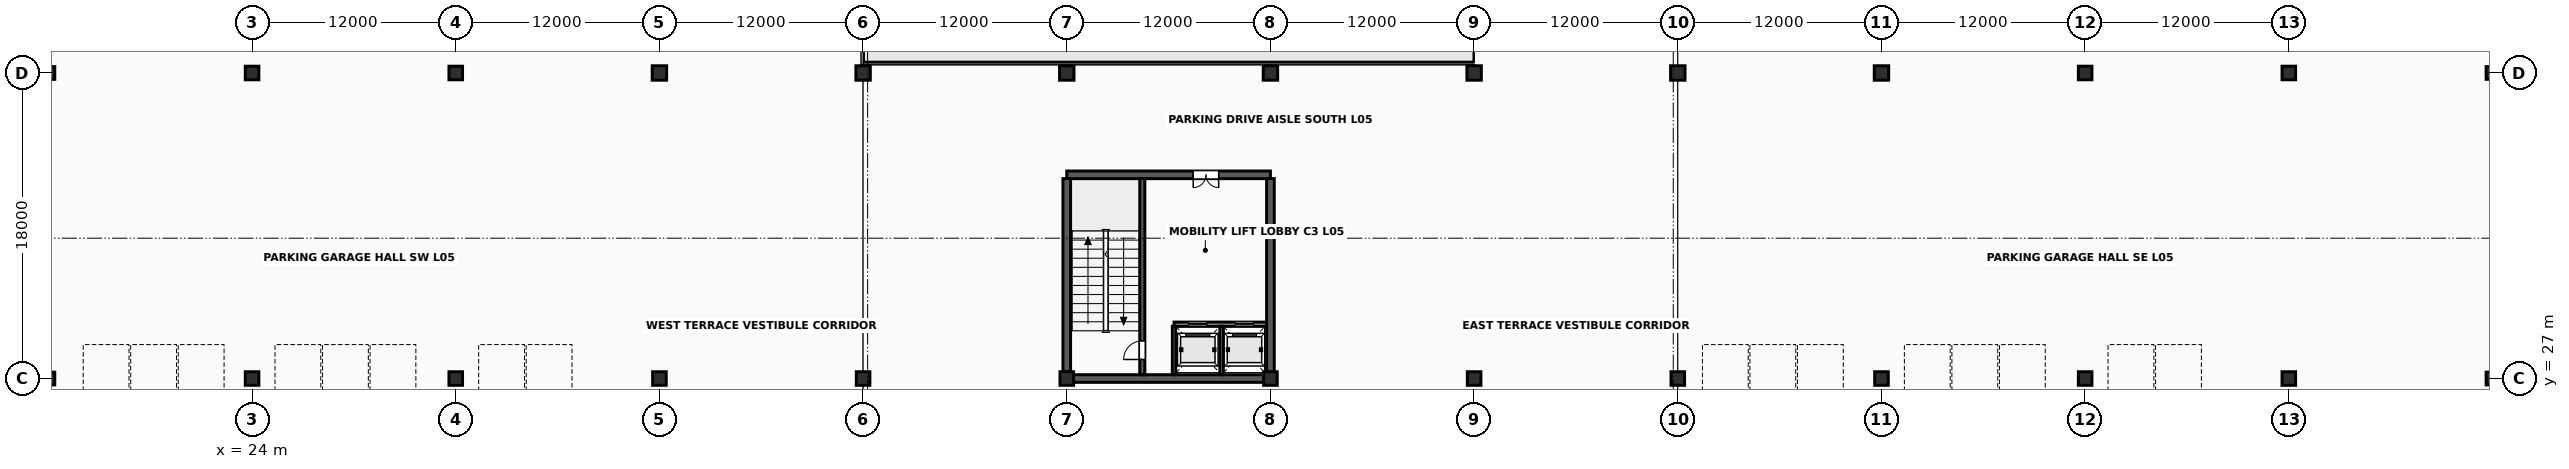
"""IFC4 building model, lengths in metres.
Left out: names, types, materials, properties, quantities, classifications, styles, units other than length and angle.
Written with IfcOpenShell. Run it as: python <this file> out.ifc"""

import sys

from ifc_helpers import new_model, si_unit, direction, frame, frame_2d, origin, origin_2d, place, context, subcontext, project, spatial, rectangle, extrude, element, fill, save


model = new_model("IFC4")
c1 = context("Model", 3, precision=1e-05, world=origin(), true_north=direction((0.0, 1.0)))
c2 = subcontext(c1, "Body", "Model", "MODEL_VIEW")
j1 = project(units=[si_unit("LENGTHUNIT", "METRE"), si_unit("PLANEANGLEUNIT", "RADIAN")], contexts=[c1])
p1 = place(None, origin())
s1 = spatial("IfcSite", under=j1, at=p1, CompositionType="ELEMENT")
p2 = place(p1, origin())
s2 = spatial("IfcBuilding", under=s1, at=p2, CompositionType="ELEMENT")
p3 = place(p2, frame((0.0, 0.0, 21.0)))
s3 = spatial("IfcBuildingStorey", under=s2, at=p3, CompositionType="ELEMENT", Elevation=21.0)
for number, where, z_axis, x_axis in (
    (1, (12.0, 27.0, 0.0), (0.0, 0.0, 1.0), (1.0, 0.0, 0.0)),
    (2, (12.0, 45.0, 0.0), (0.0, 0.0, 1.0), (1.0, 0.0, 0.0)),
):
    element("IfcColumn", number, at=place(p3, frame(where, z_axis=z_axis, x_axis=x_axis)), inside=s3, PredefinedType="COLUMN", context=c2, shape_type="SweptSolid", body=[
        extrude(rectangle(XDim=0.75, YDim=0.75, at=origin_2d()), origin(), (0.0, 0.0, 1.0), 3.8),
    ])
for number, where, z_axis, x_axis in (
    (3, (24.0, 27.0, 0.0), (0.0, 0.0, 1.0), (1.0, 0.0, 0.0)),
    (4, (24.0, 45.0, 0.0), (0.0, 0.0, 1.0), (1.0, 0.0, 0.0)),
    (5, (36.0, 27.0, 0.0), (0.0, 0.0, 1.0), (1.0, 0.0, 0.0)),
    (6, (36.0, 45.0, 0.0), (0.0, 0.0, 1.0), (1.0, 0.0, 0.0)),
    (7, (48.0, 27.0, 0.0), (0.0, 0.0, 1.0), (1.0, 0.0, 0.0)),
):
    element("IfcColumn", number, at=place(p3, frame(where, z_axis=z_axis, x_axis=x_axis)), inside=s3, PredefinedType="COLUMN", context=c2, shape_type="SweptSolid", body=[
        extrude(rectangle(XDim=0.8, YDim=0.8, at=origin_2d()), origin(), (0.0, 0.0, 1.0), 3.8),
    ])
p4 = place(p3, frame((48.0, 45.0, 0.0), z_axis=(0.0, 0.0, 1.0), x_axis=(1.0, 0.0, 0.0)))
e8 = element("IfcColumn", 8, at=p4, inside=s3, PredefinedType="COLUMN", context=c2, shape_type="SweptSolid", body=[
    extrude(rectangle(XDim=0.85, YDim=0.85, at=origin_2d()), origin(), (0.0, 0.0, 1.0), 3.8),
])
p5 = place(p3, frame((60.0, 27.0, 0.0), z_axis=(0.0, 0.0, 1.0), x_axis=(1.0, 0.0, 0.0)))
e9 = element("IfcColumn", 9, at=p5, inside=s3, PredefinedType="COLUMN", context=c2, shape_type="SweptSolid", body=[
    extrude(rectangle(XDim=0.8, YDim=0.8, at=origin_2d()), origin(), (0.0, 0.0, 1.0), 3.8),
])
p6 = place(p3, frame((60.0, 45.0, 0.0), z_axis=(0.0, 0.0, 1.0), x_axis=(1.0, 0.0, 0.0)))
e10 = element("IfcColumn", 10, at=p6, inside=s3, PredefinedType="COLUMN", context=c2, shape_type="SweptSolid", body=[
    extrude(rectangle(XDim=0.85, YDim=0.85, at=origin_2d()), origin(), (0.0, 0.0, 1.0), 3.8),
])
p7 = place(p3, frame((72.0, 27.0, 0.0), z_axis=(0.0, 0.0, 1.0), x_axis=(1.0, 0.0, 0.0)))
e11 = element("IfcColumn", 11, at=p7, inside=s3, PredefinedType="COLUMN", context=c2, shape_type="SweptSolid", body=[
    extrude(rectangle(XDim=0.8, YDim=0.8, at=origin_2d()), origin(), (0.0, 0.0, 1.0), 3.8),
])
p8 = place(p3, frame((72.0, 45.0, 0.0), z_axis=(0.0, 0.0, 1.0), x_axis=(1.0, 0.0, 0.0)))
e12 = element("IfcColumn", 12, at=p8, inside=s3, PredefinedType="COLUMN", context=c2, shape_type="SweptSolid", body=[
    extrude(rectangle(XDim=0.85, YDim=0.85, at=origin_2d()), origin(), (0.0, 0.0, 1.0), 3.8),
])
p9 = place(p3, frame((84.0, 27.0, 0.0), z_axis=(0.0, 0.0, 1.0), x_axis=(1.0, 0.0, 0.0)))
e13 = element("IfcColumn", 13, at=p9, inside=s3, PredefinedType="COLUMN", context=c2, shape_type="SweptSolid", body=[
    extrude(rectangle(XDim=0.8, YDim=0.8, at=origin_2d()), origin(), (0.0, 0.0, 1.0), 3.8),
])
p10 = place(p3, frame((84.0, 45.0, 0.0), z_axis=(0.0, 0.0, 1.0), x_axis=(1.0, 0.0, 0.0)))
e14 = element("IfcColumn", 14, at=p10, inside=s3, PredefinedType="COLUMN", context=c2, shape_type="SweptSolid", body=[
    extrude(rectangle(XDim=0.85, YDim=0.85, at=origin_2d()), origin(), (0.0, 0.0, 1.0), 3.8),
])
p11 = place(p3, frame((96.0, 27.0, 0.0), z_axis=(0.0, 0.0, 1.0), x_axis=(1.0, 0.0, 0.0)))
e15 = element("IfcColumn", 15, at=p11, inside=s3, PredefinedType="COLUMN", context=c2, shape_type="SweptSolid", body=[
    extrude(rectangle(XDim=0.8, YDim=0.8, at=origin_2d()), origin(), (0.0, 0.0, 1.0), 3.8),
])
p12 = place(p3, frame((96.0, 45.0, 0.0), z_axis=(0.0, 0.0, 1.0), x_axis=(1.0, 0.0, 0.0)))
e16 = element("IfcColumn", 16, at=p12, inside=s3, PredefinedType="COLUMN", context=c2, shape_type="SweptSolid", body=[
    extrude(rectangle(XDim=0.85, YDim=0.85, at=origin_2d()), origin(), (0.0, 0.0, 1.0), 3.8),
])
p13 = place(p3, frame((108.0, 27.0, 0.0), z_axis=(0.0, 0.0, 1.0), x_axis=(1.0, 0.0, 0.0)))
e17 = element("IfcColumn", 17, at=p13, inside=s3, PredefinedType="COLUMN", context=c2, shape_type="SweptSolid", body=[
    extrude(rectangle(XDim=0.8, YDim=0.8, at=origin_2d()), origin(), (0.0, 0.0, 1.0), 3.8),
])
p14 = place(p3, frame((108.0, 45.0, 0.0), z_axis=(0.0, 0.0, 1.0), x_axis=(1.0, 0.0, 0.0)))
e18 = element("IfcColumn", 18, at=p14, inside=s3, PredefinedType="COLUMN", context=c2, shape_type="SweptSolid", body=[
    extrude(rectangle(XDim=0.85, YDim=0.85, at=origin_2d()), origin(), (0.0, 0.0, 1.0), 3.8),
])
p15 = place(p3, frame((120.0, 27.0, 0.0), z_axis=(0.0, 0.0, 1.0), x_axis=(1.0, 0.0, 0.0)))
e19 = element("IfcColumn", 19, at=p15, inside=s3, PredefinedType="COLUMN", context=c2, shape_type="SweptSolid", body=[
    extrude(rectangle(XDim=0.8, YDim=0.8, at=origin_2d()), origin(), (0.0, 0.0, 1.0), 3.8),
])
p16 = place(p3, frame((120.0, 45.0, 0.0), z_axis=(0.0, 0.0, 1.0), x_axis=(1.0, 0.0, 0.0)))
e20 = element("IfcColumn", 20, at=p16, inside=s3, PredefinedType="COLUMN", context=c2, shape_type="SweptSolid", body=[
    extrude(rectangle(XDim=0.85, YDim=0.85, at=origin_2d()), origin(), (0.0, 0.0, 1.0), 3.8),
])
for number, where, z_axis, x_axis in (
    (21, (132.0, 27.0, 0.0), (0.0, 0.0, 1.0), (1.0, 0.0, 0.0)),
    (22, (132.0, 45.0, 0.0), (0.0, 0.0, 1.0), (1.0, 0.0, 0.0)),
    (23, (144.0, 27.0, 0.0), (0.0, 0.0, 1.0), (1.0, 0.0, 0.0)),
    (24, (144.0, 45.0, 0.0), (0.0, 0.0, 1.0), (1.0, 0.0, 0.0)),
):
    element("IfcColumn", number, at=place(p3, frame(where, z_axis=z_axis, x_axis=x_axis)), inside=s3, PredefinedType="COLUMN", context=c2, shape_type="SweptSolid", body=[
        extrude(rectangle(XDim=0.8, YDim=0.8, at=origin_2d()), origin(), (0.0, 0.0, 1.0), 3.8),
    ])
for number, where, z_axis, x_axis in (
    (25, (156.0, 27.0, 0.0), (0.0, 0.0, 1.0), (1.0, 0.0, 0.0)),
    (26, (156.0, 45.0, 0.0), (0.0, 0.0, 1.0), (1.0, 0.0, 0.0)),
):
    element("IfcColumn", number, at=place(p3, frame(where, z_axis=z_axis, x_axis=x_axis)), inside=s3, PredefinedType="COLUMN", context=c2, shape_type="SweptSolid", body=[
        extrude(rectangle(XDim=0.75, YDim=0.75, at=origin_2d()), origin(), (0.0, 0.0, 1.0), 3.8),
    ])
p17 = place(p3, frame((72.397, 27.0, 0.0), z_axis=(0.0, 0.0, 1.0), x_axis=(1.0, 0.0, 0.0)))
e27 = element("IfcWall", 27, at=p17, inside=s3, PredefinedType="SHEAR", context=c2, shape_type="SweptSolid", body=[
    extrude(rectangle(XDim=11.206, YDim=0.45, at=frame_2d((5.603, 0.0))), origin(), (0.0, 0.0, 1.0), 3.638),
])
p18 = place(p3, frame((72.0, 39.0, 0.0), z_axis=(0.0, 0.0, 1.0), x_axis=(1.0, 0.0, 0.0)))
e28 = element("IfcWall", 28, at=p18, inside=s3, PredefinedType="SHEAR", context=c2, shape_type="SweptSolid", body=[
    extrude(rectangle(XDim=12.0, YDim=0.45, at=frame_2d((6.0, 0.0))), origin(), (0.0, 0.0, 1.0), 3.638),
])
p19 = place(p18, frame((7.45, 0.0, 0.0)))
e29 = element("IfcOpeningElement", 29, at=p19, cuts=e28, PredefinedType="OPENING", context=c2, shape_type="SweptSolid", body=[
    extrude(rectangle(XDim=1.5, YDim=2.25, at=frame_2d((0.75, 1.125))), frame((0.0, 0.24, 0.0), z_axis=(0.0, -1.0, 0.0), x_axis=(1.0, 0.0, 0.0)), (0.0, 0.0, 1.0), 0.48),
])
for number, where, z_axis, x_axis in (
    (30, (72.0, 27.397, 0.0), (0.0, 0.0, 1.0), (0.0, 1.0, 0.0)),
    (31, (84.0, 27.397, 0.0), (0.0, 0.0, 1.0), (0.0, 1.0, 0.0)),
):
    element("IfcWall", number, at=place(p3, frame(where, z_axis=z_axis, x_axis=x_axis)), inside=s3, PredefinedType="SHEAR", context=c2, shape_type="SweptSolid", body=[
        extrude(rectangle(XDim=11.381, YDim=0.45, at=frame_2d((5.69, 0.0))), origin(), (0.0, 0.0, 1.0), 3.638),
    ])
p20 = place(p3, frame((76.45, 27.222, 0.0), z_axis=(0.0, 0.0, 1.0), x_axis=(0.0, 1.0, 0.0)))
e32 = element("IfcWall", 32, at=p20, inside=s3, PredefinedType="SHEAR", context=c2, shape_type="SweptSolid", body=[
    extrude(rectangle(XDim=11.556, YDim=0.3, at=frame_2d((5.778, 0.0))), origin(), (0.0, 0.0, 1.0), 3.638),
])
p21 = place(p20, frame((0.9, 0.0, 0.0)))
e33 = element("IfcOpeningElement", 33, at=p21, cuts=e32, PredefinedType="OPENING", context=c2, shape_type="SweptSolid", body=[
    extrude(rectangle(XDim=1.1, YDim=2.2, at=frame_2d((0.55, 1.1))), frame((0.0, 0.165, 0.0), z_axis=(0.0, -1.0, 0.0), x_axis=(1.0, 0.0, 0.0)), (0.0, 0.0, 1.0), 0.33),
])
p22 = place(p3, frame((78.32, 30.2, 0.0), z_axis=(0.0, 0.0, 1.0), x_axis=(1.0, 0.0, 0.0)))
e34 = element("IfcWall", 34, at=p22, inside=s3, PredefinedType="SOLIDWALL", context=c2, shape_type="SweptSolid", body=[
    extrude(rectangle(XDim=5.458, YDim=0.25, at=frame_2d((2.729, 0.0))), origin(), (0.0, 0.0, 1.0), 3.638),
])
p23 = place(p22, frame((0.86, 0.0, 0.0)))
e35 = element("IfcOpeningElement", 35, at=p23, cuts=e34, PredefinedType="OPENING", context=c2, shape_type="SweptSolid", body=[
    extrude(rectangle(XDim=1.08, YDim=2.22, at=frame_2d((0.54, 1.11))), frame((0.0, 0.14, 0.0), z_axis=(0.0, -1.0, 0.0), x_axis=(1.0, 0.0, 0.0)), (0.0, 0.0, 1.0), 0.28),
])
p24 = place(p22, frame((3.61, 0.0, 0.0)))
e36 = element("IfcOpeningElement", 36, at=p24, cuts=e34, PredefinedType="OPENING", context=c2, shape_type="SweptSolid", body=[
    extrude(rectangle(XDim=1.08, YDim=2.22, at=frame_2d((0.54, 1.11))), frame((0.0, 0.14, 0.0), z_axis=(0.0, -1.0, 0.0), x_axis=(1.0, 0.0, 0.0)), (0.0, 0.0, 1.0), 0.28),
])
for number, where, z_axis, x_axis in (
    (37, (78.32, 27.225, 0.0), (0.0, 0.0, 1.0), (0.0, 1.0, 0.0)),
    (38, (81.12, 27.225, 0.0), (0.0, 0.0, 1.0), (0.0, 1.0, 0.0)),
):
    element("IfcWall", number, at=place(p3, frame(where, z_axis=z_axis, x_axis=x_axis)), inside=s3, PredefinedType="SOLIDWALL", context=c2, shape_type="SweptSolid", body=[
        extrude(rectangle(XDim=2.855, YDim=0.2, at=frame_2d((1.427, 0.0))), origin(), (0.0, 0.0, 1.0), 3.628),
    ])
p25 = place(p21, origin())
e39 = element("IfcDoor", 39, at=p25, inside=s3, OperationType="SINGLE_SWING_LEFT", PredefinedType="DOOR", context=c2, shape_type="SweptSolid", body=[
    extrude(rectangle(XDim=1.1, YDim=2.2, at=frame_2d((0.55, 1.1))), frame((0.0, 0.025, 0.0), z_axis=(0.0, -1.0, 0.0), x_axis=(1.0, 0.0, 0.0)), (0.0, 0.0, 1.0), 0.05),
])
fill(e33, e39)
p26 = place(p19, origin())
e40 = element("IfcDoor", 40, at=p26, inside=s3, OperationType="DOUBLE_DOOR_SINGLE_SWING", PredefinedType="DOOR", context=c2, shape_type="SweptSolid", body=[
    extrude(rectangle(XDim=1.5, YDim=2.25, at=frame_2d((0.75, 1.125))), frame((0.0, 0.025, 0.0), z_axis=(0.0, -1.0, 0.0), x_axis=(1.0, 0.0, 0.0)), (0.0, 0.0, 1.0), 0.05),
])
fill(e29, e40)
p27 = place(p23, origin())
e41 = element("IfcDoor", 41, at=p27, inside=s3, OperationType="SLIDING_TO_LEFT", PredefinedType="USERDEFINED", context=c2, shape_type="SweptSolid", body=[
    extrude(rectangle(XDim=1.08, YDim=2.22, at=frame_2d((0.54, 1.11))), frame((0.0, 0.025, 0.0), z_axis=(0.0, -1.0, 0.0), x_axis=(1.0, 0.0, 0.0)), (0.0, 0.0, 1.0), 0.05),
])
fill(e35, e41)
p28 = place(p24, origin())
e42 = element("IfcDoor", 42, at=p28, inside=s3, OperationType="SLIDING_TO_LEFT", PredefinedType="USERDEFINED", context=c2, shape_type="SweptSolid", body=[
    extrude(rectangle(XDim=1.08, YDim=2.22, at=frame_2d((0.54, 1.11))), frame((0.0, 0.025, 0.0), z_axis=(0.0, -1.0, 0.0), x_axis=(1.0, 0.0, 0.0)), (0.0, 0.0, 1.0), 0.05),
])
fill(e36, e42)
save(model, sys.argv[1])
